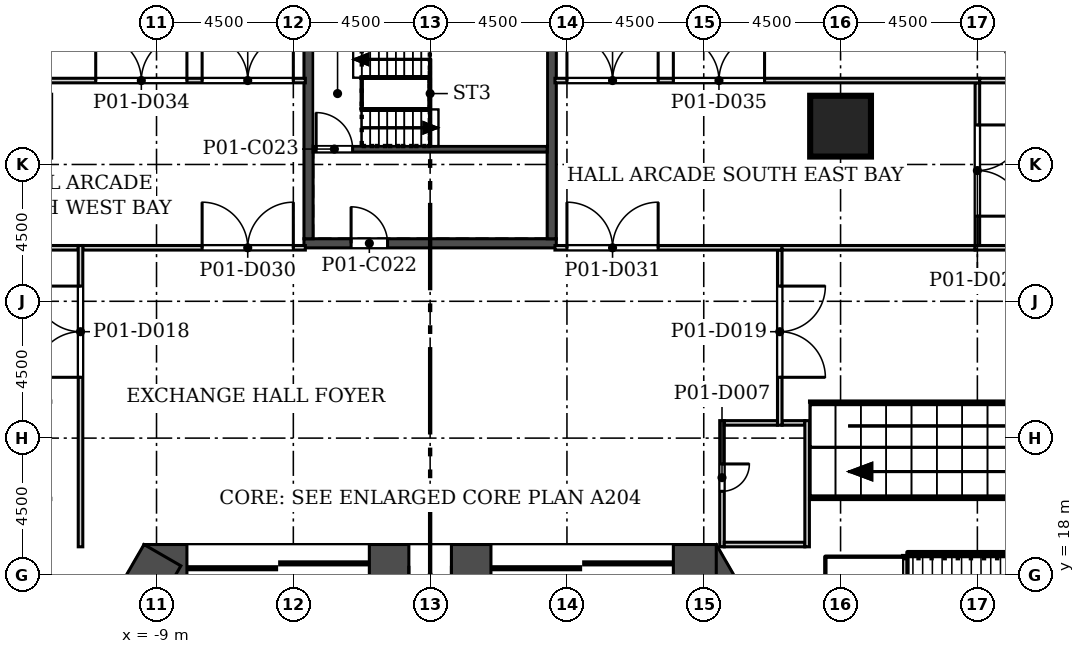
"""IFC4 building model, lengths in metres.
Left out: names, types, materials, properties, quantities, classifications, styles, units other than length and angle.
Written with IfcOpenShell. Run it as: python <this file> out.ifc"""

import sys

from ifc_helpers import new_model, si_unit, direction, frame, frame_2d, origin, origin_2d, place, context, subcontext, project, spatial, rectangle, extrude, element, fill, save


model = new_model("IFC4")
c1 = context("Model", 3, precision=1e-05, world=origin(), true_north=direction((0.0, 1.0)))
c2 = subcontext(c1, "Body", "Model", "MODEL_VIEW")
j1 = project(units=[si_unit("LENGTHUNIT", "METRE"), si_unit("PLANEANGLEUNIT", "RADIAN")], contexts=[c1])
p1 = place(None, origin())
s1 = spatial("IfcSite", under=j1, at=p1, CompositionType="ELEMENT")
p2 = place(p1, origin())
s2 = spatial("IfcBuilding", under=s1, at=p2, CompositionType="ELEMENT")
p3 = place(p2, frame((0.0, 0.0, 8.0)))
s3 = spatial("IfcBuildingStorey", under=s2, at=p3, CompositionType="ELEMENT", Elevation=8.0)
p4 = place(p3, frame((13.5, 32.76, 0.0), z_axis=(0.0, 0.0, 1.0), x_axis=(1.0, 0.0, 0.0)))
e1 = element("IfcColumn", 1, at=p4, inside=s3, PredefinedType="COLUMN", context=c2, shape_type="SweptSolid", body=[
    extrude(rectangle(XDim=2.0, YDim=2.0, at=origin_2d()), origin(), (0.0, 0.0, 1.0), 6.0),
])
p5 = place(p3, frame((13.394, 10.703, 0.0), z_axis=(0.0, 0.0, 1.0), x_axis=(-0.50000187635, 0.866024320471, 0.0)))
e2 = element("IfcWall", 2, at=p5, inside=s3, PredefinedType="SHEAR", context=c2, shape_type="SweptSolid", body=[
    extrude(rectangle(XDim=9.177, YDim=1.4, at=frame_2d((4.588, 0.0))), origin(), (0.0, 0.0, 1.0), 6.0),
])
p6 = place(p3, frame((9.412, 18.3, 0.0), z_axis=(0.0, 0.0, 1.0), x_axis=(-1.0, 0.0, 0.0)))
e3 = element("IfcWall", 3, at=p6, inside=s3, PredefinedType="SHEAR", context=c2, shape_type="SweptSolid", body=[
    extrude(rectangle(XDim=18.823, YDim=1.4, at=frame_2d((9.412, 0.0))), origin(), (0.0, 0.0, 1.0), 6.0),
])
p7 = place(p6, frame((8.711, 0.0, 0.0)))
e4 = element("IfcOpeningElement", 4, at=p7, cuts=e3, PredefinedType="OPENING", context=c2, shape_type="SweptSolid", body=[
    extrude(rectangle(XDim=1.4, YDim=2.1, at=frame_2d((0.7, 1.05))), frame((0.0, 0.71, 0.0), z_axis=(0.0, -1.0, 0.0), x_axis=(1.0, 0.0, 0.0)), (0.0, 0.0, 1.0), 1.42),
])
p8 = place(p6, frame((11.412, 0.0, 0.0)))
e5 = element("IfcOpeningElement", 5, at=p8, cuts=e3, PredefinedType="OPENING", context=c2, shape_type="SweptSolid", body=[
    extrude(rectangle(XDim=6.0, YDim=2.4, at=frame_2d((3.0, 1.2))), frame((0.0, 0.71, 0.0), z_axis=(0.0, -1.0, 0.0), x_axis=(1.0, 0.0, 0.0)), (0.0, 0.0, 1.0), 1.42),
])
p9 = place(p6, frame((1.412, 0.0, 0.0)))
e6 = element("IfcOpeningElement", 6, at=p9, cuts=e3, PredefinedType="OPENING", context=c2, shape_type="SweptSolid", body=[
    extrude(rectangle(XDim=6.0, YDim=2.4, at=frame_2d((3.0, 1.2))), frame((0.0, 0.71, 0.0), z_axis=(0.0, -1.0, 0.0), x_axis=(1.0, 0.0, 0.0)), (0.0, 0.0, 1.0), 1.42),
])
p10 = place(p3, frame((-8.805, 18.65, 0.0), z_axis=(0.0, 0.0, 1.0), x_axis=(-0.50000187635, -0.866024320471, 0.0)))
e7 = element("IfcWall", 7, at=p10, inside=s3, PredefinedType="SHEAR", context=c2, shape_type="SweptSolid", body=[
    extrude(rectangle(XDim=9.177, YDim=1.4, at=frame_2d((4.588, 0.0))), origin(), (0.0, 0.0, 1.0), 6.0),
])
p11 = place(p3, frame((-4.15, 28.907, -0.3), z_axis=(0.0, 0.0, 1.0), x_axis=(1.0, 0.0, 0.0)))
e8 = element("IfcWall", 8, at=p11, inside=s3, PredefinedType="SOLIDWALL", context=c2, shape_type="SweptSolid", body=[
    extrude(rectangle(XDim=8.3, YDim=0.3, at=frame_2d((4.15, 0.0))), origin(), (0.0, 0.0, 1.0), 6.0),
])
p12 = place(p11, frame((1.55, 0.0, 0.3)))
e9 = element("IfcOpeningElement", 9, at=p12, cuts=e8, PredefinedType="OPENING", context=c2, shape_type="SweptSolid", body=[
    extrude(rectangle(XDim=1.2, YDim=2.1, at=frame_2d((0.6, 1.05))), frame((0.0, 0.16, 0.0), z_axis=(0.0, -1.0, 0.0), x_axis=(1.0, 0.0, 0.0)), (0.0, 0.0, 1.0), 0.32),
])
for number, where, z_axis, x_axis in (
    (10, (-4.0, 29.057, -0.3), (0.0, 0.0, 1.0), (0.0, 1.0, 0.0)),
    (11, (4.0, 29.057, -0.3), (0.0, 0.0, 1.0), (0.0, 1.0, 0.0)),
):
    element("IfcWall", number, at=place(p3, frame(where, z_axis=z_axis, x_axis=x_axis)), inside=s3, PredefinedType="SOLIDWALL", context=c2, shape_type="SweptSolid", body=[
        extrude(rectangle(XDim=6.5, YDim=0.3, at=frame_2d((3.25, 0.0))), origin(), (0.0, 0.0, 1.0), 6.0),
    ])
p13 = place(p3, frame((-3.85, 32.007, -0.3), z_axis=(0.0, 0.0, 1.0), x_axis=(1.0, 0.0, 0.0)))
e12 = element("IfcWall", 12, at=p13, inside=s3, PredefinedType="SOLIDWALL", context=c2, shape_type="SweptSolid", body=[
    extrude(rectangle(XDim=7.7, YDim=0.2, at=frame_2d((3.85, 0.0))), origin(), (0.0, 0.0, 1.0), 6.0),
])
p14 = place(p13, frame((0.1, 0.0, 0.3)))
e13 = element("IfcOpeningElement", 13, at=p14, cuts=e12, PredefinedType="OPENING", context=c2, shape_type="SweptSolid", body=[
    extrude(rectangle(XDim=1.2, YDim=2.1, at=frame_2d((0.6, 1.05))), frame((0.0, 0.11, 0.0), z_axis=(0.0, -1.0, 0.0), x_axis=(1.0, 0.0, 0.0)), (0.0, 0.0, 1.0), 0.22),
])
p15 = place(p3, frame((9.6, 18.925, 0.0), z_axis=(0.0, 0.0, 1.0), x_axis=(0.0, 1.0, 0.0)))
e14 = element("IfcWall", 14, at=p15, inside=s3, PredefinedType="PARTITIONING", context=c2, shape_type="SweptSolid", body=[
    extrude(rectangle(XDim=4.15, YDim=0.15, at=frame_2d((2.075, 0.0))), origin(), (0.0, 0.0, 1.0), 5.7),
])
p16 = place(p15, frame((1.825, 0.0, 0.0)))
e15 = element("IfcOpeningElement", 15, at=p16, cuts=e14, PredefinedType="OPENING", context=c2, shape_type="SweptSolid", body=[
    extrude(rectangle(XDim=0.9, YDim=2.1, at=frame_2d((0.45, 1.05))), frame((0.0, 0.085, 0.0), z_axis=(0.0, -1.0, 0.0), x_axis=(1.0, 0.0, 0.0)), (0.0, 0.0, 1.0), 0.17),
])
p17 = place(p3, frame((12.325, 19.0, 0.0), z_axis=(0.0, 0.0, 1.0), x_axis=(-1.0, 0.0, 0.0)))
e16 = element("IfcWall", 16, at=p17, inside=s3, PredefinedType="PARTITIONING", context=c2, shape_type="SweptSolid", body=[
    extrude(rectangle(XDim=2.65, YDim=0.15, at=frame_2d((1.325, 0.0))), origin(), (0.0, 0.0, 1.0), 5.7),
])
p18 = place(p3, frame((9.675, 23.0, 0.0), z_axis=(0.0, 0.0, 1.0), x_axis=(1.0, 0.0, 0.0)))
e17 = element("IfcWall", 17, at=p18, inside=s3, PredefinedType="PARTITIONING", context=c2, shape_type="SweptSolid", body=[
    extrude(rectangle(XDim=1.75, YDim=0.15, at=frame_2d((0.875, 0.0))), origin(), (0.0, 0.0, 1.0), 5.7),
])
p19 = place(p3, frame((11.575, 23.0, 0.0), z_axis=(0.0, 0.0, 1.0), x_axis=(1.0, 0.0, 0.0)))
e18 = element("IfcWall", 18, at=p19, inside=s3, PredefinedType="PARTITIONING", context=c2, shape_type="SweptSolid", body=[
    extrude(rectangle(XDim=0.75, YDim=0.15, at=frame_2d((0.375, 0.0))), origin(), (0.0, 0.0, 1.0), 5.7),
])
p20 = place(p3, frame((12.4, 23.075, 0.0), z_axis=(0.0, 0.0, 1.0), x_axis=(0.0, -1.0, 0.0)))
e19 = element("IfcWall", 19, at=p20, inside=s3, PredefinedType="PARTITIONING", context=c2, shape_type="SweptSolid", body=[
    extrude(rectangle(XDim=4.15, YDim=0.15, at=frame_2d((2.075, 0.0))), origin(), (0.0, 0.0, 1.0), 5.7),
])
p21 = place(p3, frame((11.5, 28.685, 0.0), z_axis=(0.0, 0.0, 1.0), x_axis=(0.0, -1.0, 0.0)))
e20 = element("IfcWall", 20, at=p21, inside=s3, PredefinedType="PARTITIONING", context=c2, shape_type="SweptSolid", body=[
    extrude(rectangle(XDim=5.76, YDim=0.15, at=frame_2d((2.88, 0.0))), origin(), (0.0, 0.0, 1.0), 5.7),
])
p22 = place(p21, frame((1.185, 0.0, 0.0)))
e21 = element("IfcOpeningElement", 21, at=p22, cuts=e20, PredefinedType="OPENING", context=c2, shape_type="SweptSolid", body=[
    extrude(rectangle(XDim=3.0, YDim=2.4, at=frame_2d((1.5, 1.2))), frame((0.0, 0.085, 0.0), z_axis=(0.0, -1.0, 0.0), x_axis=(1.0, 0.0, 0.0)), (0.0, 0.0, 1.0), 0.17),
])
p23 = place(p3, frame((-17.925, 28.76, 0.0), z_axis=(0.0, 0.0, 1.0), x_axis=(1.0, 0.0, 0.0)))
e22 = element("IfcWall", 22, at=p23, inside=s3, PredefinedType="PARTITIONING", context=c2, shape_type="SweptSolid", body=[
    extrude(rectangle(XDim=6.35, YDim=0.15, at=frame_2d((3.175, 0.0))), origin(), (0.0, 0.0, 1.0), 5.7),
])
p24 = place(p3, frame((-11.425, 28.76, 0.0), z_axis=(0.0, 0.0, 1.0), x_axis=(1.0, 0.0, 0.0)))
e23 = element("IfcWall", 23, at=p24, inside=s3, PredefinedType="PARTITIONING", context=c2, shape_type="SweptSolid", body=[
    extrude(rectangle(XDim=7.32, YDim=0.15, at=frame_2d((3.66, 0.0))), origin(), (0.0, 0.0, 1.0), 5.7),
])
p25 = place(p24, frame((3.925, 0.0, 0.0)))
e24 = element("IfcOpeningElement", 24, at=p25, cuts=e23, PredefinedType="OPENING", context=c2, shape_type="SweptSolid", body=[
    extrude(rectangle(XDim=3.0, YDim=2.4, at=frame_2d((1.5, 1.2))), frame((0.0, 0.085, 0.0), z_axis=(0.0, -1.0, 0.0), x_axis=(1.0, 0.0, 0.0)), (0.0, 0.0, 1.0), 0.17),
])
p26 = place(p3, frame((4.105, 28.76, 0.0), z_axis=(0.0, 0.0, 1.0), x_axis=(1.0, 0.0, 0.0)))
e25 = element("IfcWall", 25, at=p26, inside=s3, PredefinedType="PARTITIONING", context=c2, shape_type="SweptSolid", body=[
    extrude(rectangle(XDim=7.47, YDim=0.15, at=frame_2d((3.735, 0.0))), origin(), (0.0, 0.0, 1.0), 5.7),
])
p27 = place(p26, frame((0.395, 0.0, 0.0)))
e26 = element("IfcOpeningElement", 26, at=p27, cuts=e25, PredefinedType="OPENING", context=c2, shape_type="SweptSolid", body=[
    extrude(rectangle(XDim=3.0, YDim=2.4, at=frame_2d((1.5, 1.2))), frame((0.0, 0.085, 0.0), z_axis=(0.0, -1.0, 0.0), x_axis=(1.0, 0.0, 0.0)), (0.0, 0.0, 1.0), 0.17),
])
p28 = place(p3, frame((11.575, 28.76, 0.0), z_axis=(0.0, 0.0, 1.0), x_axis=(1.0, 0.0, 0.0)))
e27 = element("IfcWall", 27, at=p28, inside=s3, PredefinedType="PARTITIONING", context=c2, shape_type="SweptSolid", body=[
    extrude(rectangle(XDim=6.35, YDim=0.15, at=frame_2d((3.175, 0.0))), origin(), (0.0, 0.0, 1.0), 5.7),
])
p29 = place(p3, frame((17.925, 28.76, 0.0), z_axis=(0.0, 0.0, 1.0), x_axis=(1.0, 0.0, 0.0)))
e28 = element("IfcWall", 28, at=p29, inside=s3, PredefinedType="PARTITIONING", context=c2, shape_type="SweptSolid", body=[
    extrude(rectangle(XDim=11.201, YDim=0.15, at=frame_2d((5.601, 0.0))), origin(), (0.0, 0.0, 1.0), 5.7),
])
p30 = place(p29, frame((1.575, 0.0, 0.0)))
e29 = element("IfcOpeningElement", 29, at=p30, cuts=e28, PredefinedType="OPENING", context=c2, shape_type="SweptSolid", body=[
    extrude(rectangle(XDim=3.0, YDim=2.4, at=frame_2d((1.5, 1.2))), frame((0.0, 0.085, 0.0), z_axis=(0.0, -1.0, 0.0), x_axis=(1.0, 0.0, 0.0)), (0.0, 0.0, 1.0), 0.17),
])
p31 = place(p3, frame((-11.5, 28.835, 0.0), z_axis=(0.0, 0.0, 1.0), x_axis=(0.0, -1.0, 0.0)))
e30 = element("IfcWall", 30, at=p31, inside=s3, PredefinedType="PARTITIONING", context=c2, shape_type="SweptSolid", body=[
    extrude(rectangle(XDim=9.91, YDim=0.15, at=frame_2d((4.955, 0.0))), origin(), (0.0, 0.0, 1.0), 5.7),
])
p32 = place(p31, frame((1.335, 0.0, 0.0)))
e31 = element("IfcOpeningElement", 31, at=p32, cuts=e30, PredefinedType="OPENING", context=c2, shape_type="SweptSolid", body=[
    extrude(rectangle(XDim=3.0, YDim=2.4, at=frame_2d((1.5, 1.2))), frame((0.0, 0.085, 0.0), z_axis=(0.0, -1.0, 0.0), x_axis=(1.0, 0.0, 0.0)), (0.0, 0.0, 1.0), 0.17),
])
p33 = place(p3, frame((18.0, 28.835, 0.0), z_axis=(0.0, 0.0, 1.0), x_axis=(0.0, 1.0, 0.0)))
e32 = element("IfcWall", 32, at=p33, inside=s3, PredefinedType="PARTITIONING", context=c2, shape_type="SweptSolid", body=[
    extrude(rectangle(XDim=5.35, YDim=0.15, at=frame_2d((2.675, 0.0))), origin(), (0.0, 0.0, 1.0), 5.7),
])
p34 = place(p33, frame((0.965, 0.0, 0.0)))
e33 = element("IfcOpeningElement", 33, at=p34, cuts=e32, PredefinedType="OPENING", context=c2, shape_type="SweptSolid", body=[
    extrude(rectangle(XDim=3.0, YDim=2.4, at=frame_2d((1.5, 1.2))), frame((0.0, 0.085, 0.0), z_axis=(0.0, -1.0, 0.0), x_axis=(1.0, 0.0, 0.0)), (0.0, 0.0, 1.0), 0.17),
])
p35 = place(p3, frame((-4.105, 34.26, 0.0), z_axis=(0.0, 0.0, 1.0), x_axis=(-1.0, 0.0, 0.0)))
e34 = element("IfcWall", 34, at=p35, inside=s3, PredefinedType="PARTITIONING", context=c2, shape_type="SweptSolid", body=[
    extrude(rectangle(XDim=13.97, YDim=0.15, at=frame_2d((6.985, 0.0))), origin(), (0.0, 0.0, 1.0), 5.7),
])
p36 = place(p35, frame((3.895, 0.0, 0.0)))
e35 = element("IfcOpeningElement", 35, at=p36, cuts=e34, PredefinedType="OPENING", context=c2, shape_type="SweptSolid", body=[
    extrude(rectangle(XDim=3.0, YDim=2.4, at=frame_2d((1.5, 1.2))), frame((0.0, 0.085, 0.0), z_axis=(0.0, -1.0, 0.0), x_axis=(1.0, 0.0, 0.0)), (0.0, 0.0, 1.0), 0.17),
])
p37 = place(p35, frame((0.395, 0.0, 0.0)))
e36 = element("IfcOpeningElement", 36, at=p37, cuts=e34, PredefinedType="OPENING", context=c2, shape_type="SweptSolid", body=[
    extrude(rectangle(XDim=3.0, YDim=2.4, at=frame_2d((1.5, 1.2))), frame((0.0, 0.085, 0.0), z_axis=(0.0, -1.0, 0.0), x_axis=(1.0, 0.0, 0.0)), (0.0, 0.0, 1.0), 0.17),
])
p38 = place(p3, frame((18.075, 34.26, 0.0), z_axis=(0.0, 0.0, 1.0), x_axis=(-1.0, 0.0, 0.0)))
e37 = element("IfcWall", 37, at=p38, inside=s3, PredefinedType="PARTITIONING", context=c2, shape_type="SweptSolid", body=[
    extrude(rectangle(XDim=13.97, YDim=0.15, at=frame_2d((6.985, 0.0))), origin(), (0.0, 0.0, 1.0), 5.7),
])
p39 = place(p38, frame((7.075, 0.0, 0.0)))
e38 = element("IfcOpeningElement", 38, at=p39, cuts=e37, PredefinedType="OPENING", context=c2, shape_type="SweptSolid", body=[
    extrude(rectangle(XDim=3.0, YDim=2.4, at=frame_2d((1.5, 1.2))), frame((0.0, 0.085, 0.0), z_axis=(0.0, -1.0, 0.0), x_axis=(1.0, 0.0, 0.0)), (0.0, 0.0, 1.0), 0.17),
])
p40 = place(p38, frame((10.575, 0.0, 0.0)))
e39 = element("IfcOpeningElement", 39, at=p40, cuts=e37, PredefinedType="OPENING", context=c2, shape_type="SweptSolid", body=[
    extrude(rectangle(XDim=3.0, YDim=2.4, at=frame_2d((1.5, 1.2))), frame((0.0, 0.085, 0.0), z_axis=(0.0, -1.0, 0.0), x_axis=(1.0, 0.0, 0.0)), (0.0, 0.0, 1.0), 0.17),
])
p41 = place(p3, frame((19.485, 34.26, 0.0), z_axis=(0.0, 0.0, 1.0), x_axis=(-1.0, 0.0, 0.0)))
e40 = element("IfcWall", 40, at=p41, inside=s3, PredefinedType="PARTITIONING", context=c2, shape_type="SweptSolid", body=[
    extrude(rectangle(XDim=1.41, YDim=0.15, at=frame_2d((0.705, 0.0))), origin(), (0.0, 0.0, 1.0), 5.7),
])
p42 = place(p3, frame((14.001, 43.887, 0.0), z_axis=(0.0, 0.0, 1.0), x_axis=(0.500006534994, -0.866021630771, 0.0)))
e41 = element("IfcWall", 41, at=p42, inside=s3, PredefinedType="PARTITIONING", context=c2, shape_type="SweptSolid", body=[
    extrude(rectangle(XDim=10.985, YDim=0.15, at=frame_2d((5.493, 0.0))), origin(), (0.0, 0.0, 1.0), 5.7),
])
p43 = place(p42, frame((0.511, 0.0, 0.0)))
e42 = element("IfcOpeningElement", 42, at=p43, cuts=e41, PredefinedType="OPENING", context=c2, shape_type="SweptSolid", body=[
    extrude(rectangle(XDim=3.0, YDim=2.4, at=frame_2d((1.5, 1.2))), frame((0.0, 0.085, 0.0), z_axis=(0.0, -1.0, 0.0), x_axis=(1.0, 0.0, 0.0)), (0.0, 0.0, 1.0), 0.17),
])
p44 = place(p3, frame((13.125, 13.45, 0.0), z_axis=(0.0, 0.0, 1.0), x_axis=(0.0, 1.0, 0.0)))
e43 = element("IfcWall", 43, at=p44, inside=s3, PredefinedType="SOLIDWALL", context=c2, shape_type="SweptSolid", body=[
    extrude(rectangle(XDim=5.1, YDim=0.25, at=frame_2d((2.55, 0.0))), origin(), (0.0, 0.0, 1.0), 5.7),
])
p45 = place(p3, frame((13.125, 18.475, 0.0), z_axis=(0.0, 0.0, 1.0), x_axis=(1.0, 0.0, 0.0)))
e44 = element("IfcWall", 44, at=p45, inside=s3, PredefinedType="SOLIDWALL", context=c2, shape_type="SweptSolid", body=[
    extrude(rectangle(XDim=2.31, YDim=0.25, at=frame_2d((1.155, 0.0))), origin(), (0.0, 0.0, 1.0), 5.7),
])
p46 = place(p7, origin())
e45 = element("IfcDoor", 45, at=p46, inside=s3, OperationType="DOUBLE_DOOR_SINGLE_SWING", PredefinedType="DOOR", context=c2, shape_type="SweptSolid", body=[
    extrude(rectangle(XDim=1.4, YDim=2.1, at=frame_2d((0.7, 1.05))), frame((0.0, 0.025, 0.0), z_axis=(0.0, -1.0, 0.0), x_axis=(1.0, 0.0, 0.0)), (0.0, 0.0, 1.0), 0.05),
])
fill(e4, e45)
p47 = place(p8, origin())
e46 = element("IfcDoor", 46, at=p47, inside=s3, OperationType="DOUBLE_DOOR_SLIDING", PredefinedType="DOOR", context=c2, shape_type="SweptSolid", body=[
    extrude(rectangle(XDim=6.0, YDim=2.4, at=frame_2d((3.0, 1.2))), frame((0.0, 0.025, 0.0), z_axis=(0.0, -1.0, 0.0), x_axis=(1.0, 0.0, 0.0)), (0.0, 0.0, 1.0), 0.05),
])
fill(e5, e46)
p48 = place(p9, origin())
e47 = element("IfcDoor", 47, at=p48, inside=s3, OperationType="DOUBLE_DOOR_SLIDING", PredefinedType="DOOR", context=c2, shape_type="SweptSolid", body=[
    extrude(rectangle(XDim=6.0, YDim=2.4, at=frame_2d((3.0, 1.2))), frame((0.0, 0.025, 0.0), z_axis=(0.0, -1.0, 0.0), x_axis=(1.0, 0.0, 0.0)), (0.0, 0.0, 1.0), 0.05),
])
fill(e6, e47)
p49 = place(p12, origin())
e48 = element("IfcDoor", 48, at=p49, inside=s3, OperationType="SINGLE_SWING_LEFT", PredefinedType="DOOR", context=c2, shape_type="SweptSolid", body=[
    extrude(rectangle(XDim=1.2, YDim=2.1, at=frame_2d((0.6, 1.05))), frame((0.0, 0.025, 0.0), z_axis=(0.0, -1.0, 0.0), x_axis=(1.0, 0.0, 0.0)), (0.0, 0.0, 1.0), 0.05),
])
fill(e9, e48)
p50 = place(p14, origin())
e49 = element("IfcDoor", 49, at=p50, inside=s3, OperationType="SINGLE_SWING_LEFT", PredefinedType="DOOR", context=c2, shape_type="SweptSolid", body=[
    extrude(rectangle(XDim=1.2, YDim=2.1, at=frame_2d((0.6, 1.05))), frame((0.0, 0.025, 0.0), z_axis=(0.0, -1.0, 0.0), x_axis=(1.0, 0.0, 0.0)), (0.0, 0.0, 1.0), 0.05),
])
fill(e13, e49)
p51 = place(p16, frame((0.9, 0.0, 0.0), z_axis=(0.0, 0.0, 1.0), x_axis=(-1.0, 0.0, 0.0)))
e50 = element("IfcDoor", 50, at=p51, inside=s3, OperationType="SINGLE_SWING_LEFT", PredefinedType="DOOR", context=c2, shape_type="SweptSolid", body=[
    extrude(rectangle(XDim=0.9, YDim=2.1, at=frame_2d((0.45, 1.05))), frame((0.0, 0.025, 0.0), z_axis=(0.0, -1.0, 0.0), x_axis=(1.0, 0.0, 0.0)), (0.0, 0.0, 1.0), 0.05),
])
fill(e15, e50)
p52 = place(p32, frame((3.0, 0.0, 0.0), z_axis=(0.0, 0.0, 1.0), x_axis=(-1.0, 0.0, 0.0)))
e51 = element("IfcDoor", 51, at=p52, inside=s3, OperationType="DOUBLE_DOOR_SINGLE_SWING", PredefinedType="DOOR", context=c2, shape_type="SweptSolid", body=[
    extrude(rectangle(XDim=3.0, YDim=2.4, at=frame_2d((1.5, 1.2))), frame((0.0, 0.025, 0.0), z_axis=(0.0, -1.0, 0.0), x_axis=(1.0, 0.0, 0.0)), (0.0, 0.0, 1.0), 0.05),
])
fill(e31, e51)
p53 = place(p22, origin())
e52 = element("IfcDoor", 52, at=p53, inside=s3, OperationType="DOUBLE_DOOR_SINGLE_SWING", PredefinedType="DOOR", context=c2, shape_type="SweptSolid", body=[
    extrude(rectangle(XDim=3.0, YDim=2.4, at=frame_2d((1.5, 1.2))), frame((0.0, 0.025, 0.0), z_axis=(0.0, -1.0, 0.0), x_axis=(1.0, 0.0, 0.0)), (0.0, 0.0, 1.0), 0.05),
])
fill(e21, e52)
p54 = place(p34, frame((3.0, 0.0, 0.0), z_axis=(0.0, 0.0, 1.0), x_axis=(-1.0, 0.0, 0.0)))
e53 = element("IfcDoor", 53, at=p54, inside=s3, OperationType="DOUBLE_DOOR_SINGLE_SWING", PredefinedType="DOOR", context=c2, shape_type="SweptSolid", body=[
    extrude(rectangle(XDim=3.0, YDim=2.4, at=frame_2d((1.5, 1.2))), frame((0.0, 0.025, 0.0), z_axis=(0.0, -1.0, 0.0), x_axis=(1.0, 0.0, 0.0)), (0.0, 0.0, 1.0), 0.05),
])
fill(e33, e53)
p55 = place(p25, origin())
e54 = element("IfcDoor", 54, at=p55, inside=s3, OperationType="DOUBLE_DOOR_SINGLE_SWING", PredefinedType="DOOR", context=c2, shape_type="SweptSolid", body=[
    extrude(rectangle(XDim=3.0, YDim=2.4, at=frame_2d((1.5, 1.2))), frame((0.0, 0.025, 0.0), z_axis=(0.0, -1.0, 0.0), x_axis=(1.0, 0.0, 0.0)), (0.0, 0.0, 1.0), 0.05),
])
fill(e24, e54)
p56 = place(p27, origin())
e55 = element("IfcDoor", 55, at=p56, inside=s3, OperationType="DOUBLE_DOOR_SINGLE_SWING", PredefinedType="DOOR", context=c2, shape_type="SweptSolid", body=[
    extrude(rectangle(XDim=3.0, YDim=2.4, at=frame_2d((1.5, 1.2))), frame((0.0, 0.025, 0.0), z_axis=(0.0, -1.0, 0.0), x_axis=(1.0, 0.0, 0.0)), (0.0, 0.0, 1.0), 0.05),
])
fill(e26, e55)
p57 = place(p36, frame((3.0, 0.0, 0.0), z_axis=(0.0, 0.0, 1.0), x_axis=(-1.0, 0.0, 0.0)))
e56 = element("IfcDoor", 56, at=p57, inside=s3, OperationType="DOUBLE_DOOR_SINGLE_SWING", PredefinedType="DOOR", context=c2, shape_type="SweptSolid", body=[
    extrude(rectangle(XDim=3.0, YDim=2.4, at=frame_2d((1.5, 1.2))), frame((0.0, 0.025, 0.0), z_axis=(0.0, -1.0, 0.0), x_axis=(1.0, 0.0, 0.0)), (0.0, 0.0, 1.0), 0.05),
])
fill(e35, e56)
p58 = place(p39, frame((3.0, 0.0, 0.0), z_axis=(0.0, 0.0, 1.0), x_axis=(-1.0, 0.0, 0.0)))
e57 = element("IfcDoor", 57, at=p58, inside=s3, OperationType="DOUBLE_DOOR_SINGLE_SWING", PredefinedType="DOOR", context=c2, shape_type="SweptSolid", body=[
    extrude(rectangle(XDim=3.0, YDim=2.4, at=frame_2d((1.5, 1.2))), frame((0.0, 0.025, 0.0), z_axis=(0.0, -1.0, 0.0), x_axis=(1.0, 0.0, 0.0)), (0.0, 0.0, 1.0), 0.05),
])
fill(e38, e57)
p59 = place(p37, frame((3.0, 0.0, 0.0), z_axis=(0.0, 0.0, 1.0), x_axis=(-1.0, 0.0, 0.0)))
e58 = element("IfcDoor", 58, at=p59, inside=s3, OperationType="DOUBLE_DOOR_SINGLE_SWING", PredefinedType="DOOR", context=c2, shape_type="SweptSolid", body=[
    extrude(rectangle(XDim=3.0, YDim=2.4, at=frame_2d((1.5, 1.2))), frame((0.0, 0.025, 0.0), z_axis=(0.0, -1.0, 0.0), x_axis=(1.0, 0.0, 0.0)), (0.0, 0.0, 1.0), 0.05),
])
fill(e36, e58)
p60 = place(p40, frame((3.0, 0.0, 0.0), z_axis=(0.0, 0.0, 1.0), x_axis=(-1.0, 0.0, 0.0)))
e59 = element("IfcDoor", 59, at=p60, inside=s3, OperationType="DOUBLE_DOOR_SINGLE_SWING", PredefinedType="DOOR", context=c2, shape_type="SweptSolid", body=[
    extrude(rectangle(XDim=3.0, YDim=2.4, at=frame_2d((1.5, 1.2))), frame((0.0, 0.025, 0.0), z_axis=(0.0, -1.0, 0.0), x_axis=(1.0, 0.0, 0.0)), (0.0, 0.0, 1.0), 0.05),
])
fill(e39, e59)
save(model, sys.argv[1])
